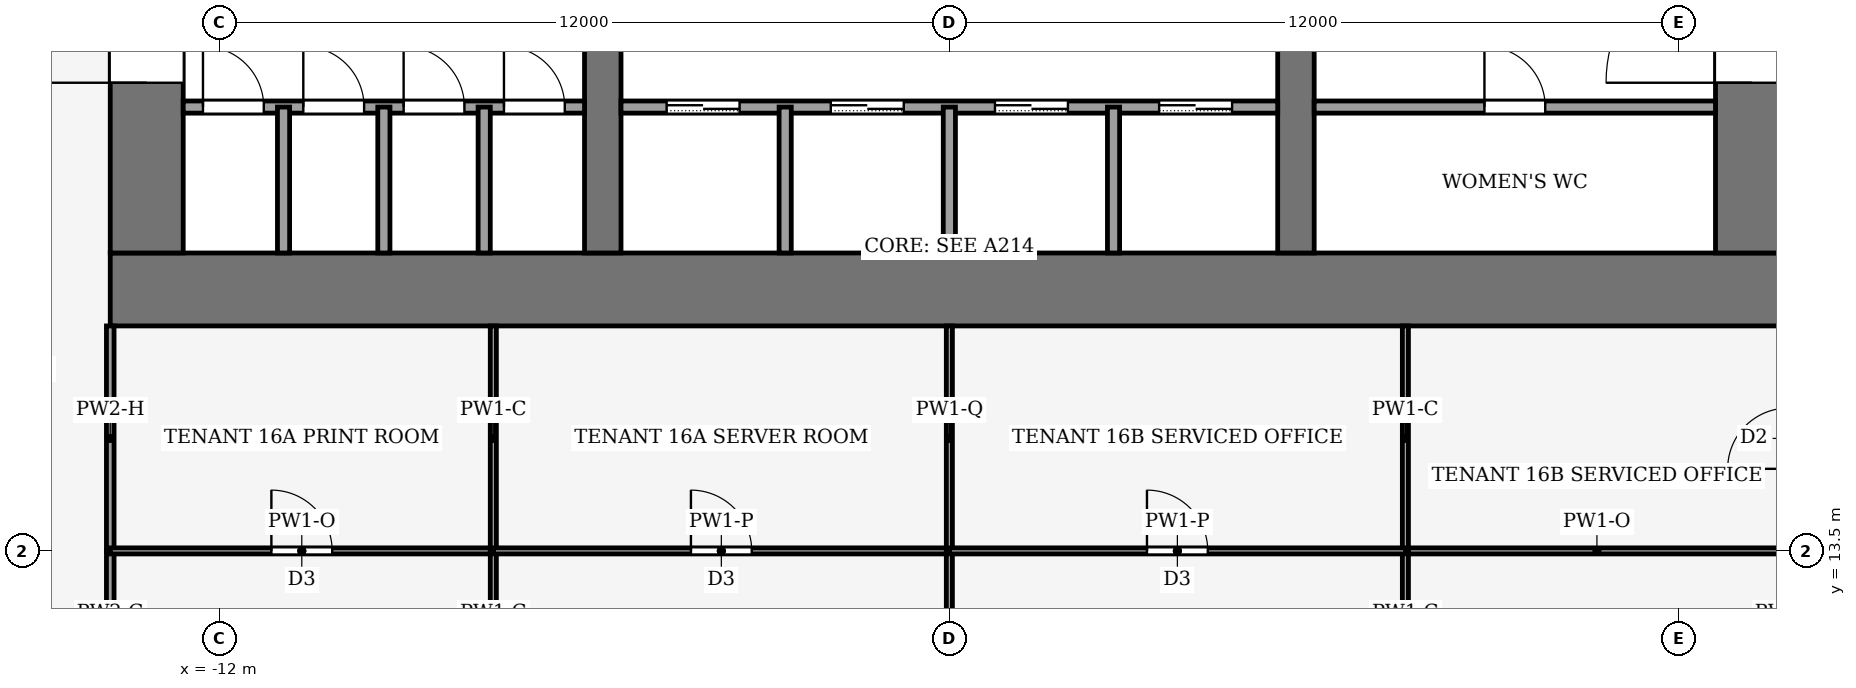
"""IFC4 building model, lengths in metres.
Left out: names, types, materials, properties, quantities, classifications, styles, units other than length and angle.
Written with IfcOpenShell. Run it as: python <this file> out.ifc"""

import sys

from ifc_helpers import new_model, si_unit, direction, frame, frame_2d, origin, place, context, subcontext, project, spatial, rectangle, extrude, element, fill, save


model = new_model("IFC4")
c1 = context("Model", 3, precision=1e-05, world=origin(), true_north=direction((0.0, 1.0)))
c2 = subcontext(c1, "Body", "Model", "MODEL_VIEW")
j1 = project(units=[si_unit("LENGTHUNIT", "METRE"), si_unit("PLANEANGLEUNIT", "RADIAN")], contexts=[c1])
p1 = place(None, origin())
s1 = spatial("IfcSite", under=j1, at=p1, CompositionType="ELEMENT")
p2 = place(p1, origin())
s2 = spatial("IfcBuilding", under=s1, at=p2, CompositionType="ELEMENT")
p3 = place(p2, frame((0.0, 0.0, 74.0)))
s3 = spatial("IfcBuildingStorey", under=s2, at=p3, CompositionType="ELEMENT", Elevation=74.0)
p4 = place(p3, frame((-13.8, 17.8, -0.13), z_axis=(0.0, 0.0, 1.0), x_axis=(1.0, 0.0, 0.0)))
e1 = element("IfcWall", 1, at=p4, inside=s3, PredefinedType="SHEAR", context=c2, shape_type="SweptSolid", body=[
    extrude(rectangle(XDim=27.6, YDim=1.2, at=frame_2d((13.8, 0.0))), origin(), (0.0, 0.0, 1.0), 4.0),
])
p5 = place(p3, frame((-13.2, 18.4, -0.13), z_axis=(0.0, 0.0, 1.0), x_axis=(0.0, 1.0, 0.0)))
e2 = element("IfcWall", 2, at=p5, inside=s3, PredefinedType="SHEAR", context=c2, shape_type="SweptSolid", body=[
    extrude(rectangle(XDim=19.2, YDim=1.2, at=frame_2d((9.6, 0.0))), origin(), (0.0, 0.0, 1.0), 4.0),
])
p6 = place(p5, frame((2.8, 0.0, 0.13)))
e3 = element("IfcOpeningElement", 3, at=p6, cuts=e2, PredefinedType="OPENING", context=c2, shape_type="SweptSolid", body=[
    extrude(rectangle(XDim=2.4, YDim=2.4, at=frame_2d((1.2, 1.2))), frame((0.0, 0.61, 0.0), z_axis=(0.0, -1.0, 0.0), x_axis=(1.0, 0.0, 0.0)), (0.0, 0.0, 1.0), 1.22),
])
p7 = place(p5, frame((13.4, 0.0, 0.13)))
e4 = element("IfcOpeningElement", 4, at=p7, cuts=e2, PredefinedType="OPENING", context=c2, shape_type="SweptSolid", body=[
    extrude(rectangle(XDim=1.4, YDim=2.2, at=frame_2d((0.7, 1.1))), frame((0.0, 0.61, 0.0), z_axis=(0.0, -1.0, 0.0), x_axis=(1.0, 0.0, 0.0)), (0.0, 0.0, 1.0), 1.22),
])
p8 = place(p3, frame((13.2, 18.4, -0.13), z_axis=(0.0, 0.0, 1.0), x_axis=(0.0, 1.0, 0.0)))
e5 = element("IfcWall", 5, at=p8, inside=s3, PredefinedType="SHEAR", context=c2, shape_type="SweptSolid", body=[
    extrude(rectangle(XDim=19.2, YDim=1.2, at=frame_2d((9.6, 0.0))), origin(), (0.0, 0.0, 1.0), 4.0),
])
p9 = place(p8, frame((2.8, 0.0, 0.13)))
e6 = element("IfcOpeningElement", 6, at=p9, cuts=e5, PredefinedType="OPENING", context=c2, shape_type="SweptSolid", body=[
    extrude(rectangle(XDim=2.4, YDim=2.4, at=frame_2d((1.2, 1.2))), frame((0.0, 0.61, 0.0), z_axis=(0.0, -1.0, 0.0), x_axis=(1.0, 0.0, 0.0)), (0.0, 0.0, 1.0), 1.22),
])
p10 = place(p8, frame((13.3, 0.0, 0.13)))
e7 = element("IfcOpeningElement", 7, at=p10, cuts=e5, PredefinedType="OPENING", context=c2, shape_type="SweptSolid", body=[
    extrude(rectangle(XDim=2.4, YDim=2.4, at=frame_2d((1.2, 1.2))), frame((0.0, 0.61, 0.0), z_axis=(0.0, -1.0, 0.0), x_axis=(1.0, 0.0, 0.0)), (0.0, 0.0, 1.0), 1.22),
])
p11 = place(p3, frame((-5.7, 18.4, -0.13), z_axis=(0.0, 0.0, 1.0), x_axis=(0.0, 1.0, 0.0)))
e8 = element("IfcWall", 8, at=p11, inside=s3, PredefinedType="SHEAR", context=c2, shape_type="SweptSolid", body=[
    extrude(rectangle(XDim=19.2, YDim=0.6, at=frame_2d((9.6, 0.0))), origin(), (0.0, 0.0, 1.0), 4.0),
])
p12 = place(p11, frame((8.35, 0.0, 0.13)))
e9 = element("IfcOpeningElement", 9, at=p12, cuts=e8, PredefinedType="OPENING", context=c2, shape_type="SweptSolid", body=[
    extrude(rectangle(XDim=0.9, YDim=2.1, at=frame_2d((0.45, 1.05))), frame((0.0, 0.31, 0.0), z_axis=(0.0, -1.0, 0.0), x_axis=(1.0, 0.0, 0.0)), (0.0, 0.0, 1.0), 0.62),
])
p13 = place(p3, frame((5.7, 18.4, -0.13), z_axis=(0.0, 0.0, 1.0), x_axis=(0.0, 1.0, 0.0)))
e10 = element("IfcWall", 10, at=p13, inside=s3, PredefinedType="SHEAR", context=c2, shape_type="SweptSolid", body=[
    extrude(rectangle(XDim=19.2, YDim=0.6, at=frame_2d((9.6, 0.0))), origin(), (0.0, 0.0, 1.0), 4.0),
])
p14 = place(p13, frame((8.35, 0.0, 0.13)))
e11 = element("IfcOpeningElement", 11, at=p14, cuts=e10, PredefinedType="OPENING", context=c2, shape_type="SweptSolid", body=[
    extrude(rectangle(XDim=0.9, YDim=2.1, at=frame_2d((0.45, 1.05))), frame((0.0, 0.31, 0.0), z_axis=(0.0, -1.0, 0.0), x_axis=(1.0, 0.0, 0.0)), (0.0, 0.0, 1.0), 0.62),
])
p15 = place(p13, frame((13.3, 0.0, 0.13)))
e12 = element("IfcOpeningElement", 12, at=p15, cuts=e10, PredefinedType="OPENING", context=c2, shape_type="SweptSolid", body=[
    extrude(rectangle(XDim=2.4, YDim=2.4, at=frame_2d((1.2, 1.2))), frame((0.0, 0.31, 0.0), z_axis=(0.0, -1.0, 0.0), x_axis=(1.0, 0.0, 0.0)), (0.0, 0.0, 1.0), 0.62),
])
p16 = place(p3, frame((-12.6, 20.8, 0.0), z_axis=(0.0, 0.0, 1.0), x_axis=(1.0, 0.0, 0.0)))
e13 = element("IfcWall", 13, at=p16, inside=s3, PredefinedType="PARTITIONING", context=c2, shape_type="SweptSolid", body=[
    extrude(rectangle(XDim=6.6, YDim=0.2, at=frame_2d((3.3, 0.0))), origin(), (0.0, 0.0, 1.0), 3.87),
])
p17 = place(p16, frame((0.325, 0.0, 0.0)))
e14 = element("IfcOpeningElement", 14, at=p17, cuts=e13, PredefinedType="OPENING", context=c2, shape_type="SweptSolid", body=[
    extrude(rectangle(XDim=1.0, YDim=2.1, at=frame_2d((0.5, 1.05))), frame((0.0, 0.11, 0.0), z_axis=(0.0, -1.0, 0.0), x_axis=(1.0, 0.0, 0.0)), (0.0, 0.0, 1.0), 0.22),
])
p18 = place(p16, frame((1.975, 0.0, 0.0)))
e15 = element("IfcOpeningElement", 15, at=p18, cuts=e13, PredefinedType="OPENING", context=c2, shape_type="SweptSolid", body=[
    extrude(rectangle(XDim=1.0, YDim=2.1, at=frame_2d((0.5, 1.05))), frame((0.0, 0.11, 0.0), z_axis=(0.0, -1.0, 0.0), x_axis=(1.0, 0.0, 0.0)), (0.0, 0.0, 1.0), 0.22),
])
p19 = place(p16, frame((3.625, 0.0, 0.0)))
e16 = element("IfcOpeningElement", 16, at=p19, cuts=e13, PredefinedType="OPENING", context=c2, shape_type="SweptSolid", body=[
    extrude(rectangle(XDim=1.0, YDim=2.1, at=frame_2d((0.5, 1.05))), frame((0.0, 0.11, 0.0), z_axis=(0.0, -1.0, 0.0), x_axis=(1.0, 0.0, 0.0)), (0.0, 0.0, 1.0), 0.22),
])
p20 = place(p16, frame((5.275, 0.0, 0.0)))
e17 = element("IfcOpeningElement", 17, at=p20, cuts=e13, PredefinedType="OPENING", context=c2, shape_type="SweptSolid", body=[
    extrude(rectangle(XDim=1.0, YDim=2.1, at=frame_2d((0.5, 1.05))), frame((0.0, 0.11, 0.0), z_axis=(0.0, -1.0, 0.0), x_axis=(1.0, 0.0, 0.0)), (0.0, 0.0, 1.0), 0.22),
])
p21 = place(p3, frame((-5.4, 20.8, 0.0), z_axis=(0.0, 0.0, 1.0), x_axis=(1.0, 0.0, 0.0)))
e18 = element("IfcWall", 18, at=p21, inside=s3, PredefinedType="PARTITIONING", context=c2, shape_type="SweptSolid", body=[
    extrude(rectangle(XDim=10.8, YDim=0.2, at=frame_2d((5.4, 0.0))), origin(), (0.0, 0.0, 1.0), 3.87),
])
p22 = place(p21, frame((0.75, 0.0, 0.0)))
e19 = element("IfcOpeningElement", 19, at=p22, cuts=e18, PredefinedType="OPENING", context=c2, shape_type="SweptSolid", body=[
    extrude(rectangle(XDim=1.2, YDim=2.2, at=frame_2d((0.6, 1.1))), frame((0.0, 0.11, 0.0), z_axis=(0.0, -1.0, 0.0), x_axis=(1.0, 0.0, 0.0)), (0.0, 0.0, 1.0), 0.22),
])
p23 = place(p21, frame((3.45, 0.0, 0.0)))
e20 = element("IfcOpeningElement", 20, at=p23, cuts=e18, PredefinedType="OPENING", context=c2, shape_type="SweptSolid", body=[
    extrude(rectangle(XDim=1.2, YDim=2.2, at=frame_2d((0.6, 1.1))), frame((0.0, 0.11, 0.0), z_axis=(0.0, -1.0, 0.0), x_axis=(1.0, 0.0, 0.0)), (0.0, 0.0, 1.0), 0.22),
])
p24 = place(p21, frame((6.15, 0.0, 0.0)))
e21 = element("IfcOpeningElement", 21, at=p24, cuts=e18, PredefinedType="OPENING", context=c2, shape_type="SweptSolid", body=[
    extrude(rectangle(XDim=1.2, YDim=2.2, at=frame_2d((0.6, 1.1))), frame((0.0, 0.11, 0.0), z_axis=(0.0, -1.0, 0.0), x_axis=(1.0, 0.0, 0.0)), (0.0, 0.0, 1.0), 0.22),
])
p25 = place(p21, frame((8.85, 0.0, 0.0)))
e22 = element("IfcOpeningElement", 22, at=p25, cuts=e18, PredefinedType="OPENING", context=c2, shape_type="SweptSolid", body=[
    extrude(rectangle(XDim=1.2, YDim=2.2, at=frame_2d((0.6, 1.1))), frame((0.0, 0.11, 0.0), z_axis=(0.0, -1.0, 0.0), x_axis=(1.0, 0.0, 0.0)), (0.0, 0.0, 1.0), 0.22),
])
p26 = place(p3, frame((6.0, 20.8, 0.0), z_axis=(0.0, 0.0, 1.0), x_axis=(1.0, 0.0, 0.0)))
e23 = element("IfcWall", 23, at=p26, inside=s3, PredefinedType="PARTITIONING", context=c2, shape_type="SweptSolid", body=[
    extrude(rectangle(XDim=6.6, YDim=0.2, at=frame_2d((3.3, 0.0))), origin(), (0.0, 0.0, 1.0), 3.87),
])
p27 = place(p26, frame((2.8, 0.0, 0.0)))
e24 = element("IfcOpeningElement", 24, at=p27, cuts=e23, PredefinedType="OPENING", context=c2, shape_type="SweptSolid", body=[
    extrude(rectangle(XDim=1.0, YDim=2.1, at=frame_2d((0.5, 1.05))), frame((0.0, 0.11, 0.0), z_axis=(0.0, -1.0, 0.0), x_axis=(1.0, 0.0, 0.0)), (0.0, 0.0, 1.0), 0.22),
])
for number, where, z_axis, x_axis in (
    (25, (-10.95, 18.4, 0.0), (0.0, 0.0, 1.0), (0.0, 1.0, 0.0)),
    (26, (-9.3, 18.4, 0.0), (0.0, 0.0, 1.0), (0.0, 1.0, 0.0)),
    (27, (-7.65, 18.4, 0.0), (0.0, 0.0, 1.0), (0.0, 1.0, 0.0)),
    (28, (-2.7, 18.4, 0.0), (0.0, 0.0, 1.0), (0.0, 1.0, 0.0)),
    (29, (0.0, 18.4, 0.0), (0.0, 0.0, 1.0), (0.0, 1.0, 0.0)),
    (30, (2.7, 18.4, 0.0), (0.0, 0.0, 1.0), (0.0, 1.0, 0.0)),
):
    element("IfcWall", number, at=place(p3, frame(where, z_axis=z_axis, x_axis=x_axis)), inside=s3, PredefinedType="PARTITIONING", context=c2, shape_type="SweptSolid", body=[
        extrude(rectangle(XDim=2.4, YDim=0.2, at=frame_2d((1.2, 0.0))), origin(), (0.0, 0.0, 1.0), 3.87),
    ])
p28 = place(p3, frame((-13.8, 10.5, 0.0), z_axis=(0.0, 0.0, 1.0), x_axis=(0.0, 1.0, 0.0)))
e31 = element("IfcWall", 31, at=p28, inside=s3, PredefinedType="PARTITIONING", context=c2, shape_type="SweptSolid", body=[
    extrude(rectangle(XDim=3.0, YDim=0.125, at=frame_2d((1.5, 0.0))), origin(), (0.0, 0.0, 1.0), 3.87),
])
p29 = place(p3, frame((-13.8, 13.5, 0.0), z_axis=(0.0, 0.0, 1.0), x_axis=(0.0, 1.0, 0.0)))
e32 = element("IfcWall", 32, at=p29, inside=s3, PredefinedType="PARTITIONING", context=c2, shape_type="SweptSolid", body=[
    extrude(rectangle(XDim=3.7, YDim=0.125, at=frame_2d((1.85, 0.0))), origin(), (0.0, 0.0, 1.0), 3.14),
])
p30 = place(p3, frame((-13.8, 13.5, 0.0), z_axis=(0.0, 0.0, 1.0), x_axis=(1.0, 0.0, 0.0)))
e33 = element("IfcWall", 33, at=p30, inside=s3, PredefinedType="PARTITIONING", context=c2, shape_type="SweptSolid", body=[
    extrude(rectangle(XDim=6.3, YDim=0.1, at=frame_2d((3.15, 0.0))), origin(), (0.0, 0.0, 1.0), 3.39),
])
p31 = place(p30, frame((2.65, 0.0, 0.0)))
e34 = element("IfcOpeningElement", 34, at=p31, cuts=e33, PredefinedType="OPENING", context=c2, shape_type="SweptSolid", body=[
    extrude(rectangle(XDim=1.0, YDim=2.1, at=frame_2d((0.5, 1.05))), frame((0.0, 0.06, 0.0), z_axis=(0.0, -1.0, 0.0), x_axis=(1.0, 0.0, 0.0)), (0.0, 0.0, 1.0), 0.12),
])
p32 = place(p3, frame((-7.5, 10.496, 0.0), z_axis=(0.0, 0.0, 1.0), x_axis=(0.0, 1.0, 0.0)))
e35 = element("IfcWall", 35, at=p32, inside=s3, PredefinedType="PARTITIONING", context=c2, shape_type="SweptSolid", body=[
    extrude(rectangle(XDim=3.004, YDim=0.1, at=frame_2d((1.502, 0.0))), origin(), (0.0, 0.0, 1.0), 3.87),
])
p33 = place(p3, frame((-7.5, 13.5, 0.0), z_axis=(0.0, 0.0, 1.0), x_axis=(0.0, 1.0, 0.0)))
e36 = element("IfcWall", 36, at=p33, inside=s3, PredefinedType="PARTITIONING", context=c2, shape_type="SweptSolid", body=[
    extrude(rectangle(XDim=3.7, YDim=0.1, at=frame_2d((1.85, 0.0))), origin(), (0.0, 0.0, 1.0), 3.87),
])
p34 = place(p3, frame((-7.5, 13.5, 0.0), z_axis=(0.0, 0.0, 1.0), x_axis=(1.0, 0.0, 0.0)))
e37 = element("IfcWall", 37, at=p34, inside=s3, PredefinedType="PARTITIONING", context=c2, shape_type="SweptSolid", body=[
    extrude(rectangle(XDim=7.5, YDim=0.1, at=frame_2d((3.75, 0.0))), origin(), (0.0, 0.0, 1.0), 3.44),
])
p35 = place(p34, frame((3.25, 0.0, 0.0)))
e38 = element("IfcOpeningElement", 38, at=p35, cuts=e37, PredefinedType="OPENING", context=c2, shape_type="SweptSolid", body=[
    extrude(rectangle(XDim=1.0, YDim=2.1, at=frame_2d((0.5, 1.05))), frame((0.0, 0.06, 0.0), z_axis=(0.0, -1.0, 0.0), x_axis=(1.0, 0.0, 0.0)), (0.0, 0.0, 1.0), 0.12),
])
p36 = place(p3, frame((0.0, 5.92, 0.0), z_axis=(0.0, 0.0, 1.0), x_axis=(0.0, 1.0, 0.0)))
e39 = element("IfcWall", 39, at=p36, inside=s3, PredefinedType="PARTITIONING", context=c2, shape_type="SweptSolid", body=[
    extrude(rectangle(XDim=7.58, YDim=0.1, at=frame_2d((3.79, 0.0))), origin(), (0.0, 0.0, 1.0), 3.04),
])
p37 = place(p3, frame((0.0, 13.5, 0.0), z_axis=(0.0, 0.0, 1.0), x_axis=(0.0, 1.0, 0.0)))
e40 = element("IfcWall", 40, at=p37, inside=s3, PredefinedType="PARTITIONING", context=c2, shape_type="SweptSolid", body=[
    extrude(rectangle(XDim=3.7, YDim=0.1, at=frame_2d((1.85, 0.0))), origin(), (0.0, 0.0, 1.0), 3.48),
])
p38 = place(p3, frame((13.8, 13.5, 0.0), z_axis=(0.0, 0.0, 1.0), x_axis=(-1.0, 0.0, 0.0)))
e41 = element("IfcWall", 41, at=p38, inside=s3, PredefinedType="PARTITIONING", context=c2, shape_type="SweptSolid", body=[
    extrude(rectangle(XDim=6.3, YDim=0.1, at=frame_2d((3.15, 0.0))), origin(), (0.0, 0.0, 1.0), 3.39),
])
p39 = place(p3, frame((7.5, 13.5, 0.0), z_axis=(0.0, 0.0, 1.0), x_axis=(0.0, -1.0, 0.0)))
e42 = element("IfcWall", 42, at=p39, inside=s3, PredefinedType="PARTITIONING", context=c2, shape_type="SweptSolid", body=[
    extrude(rectangle(XDim=3.004, YDim=0.1, at=frame_2d((1.502, 0.0))), origin(), (0.0, 0.0, 1.0), 3.87),
])
p40 = place(p3, frame((7.5, 17.2, 0.0), z_axis=(0.0, 0.0, 1.0), x_axis=(0.0, -1.0, 0.0)))
e43 = element("IfcWall", 43, at=p40, inside=s3, PredefinedType="PARTITIONING", context=c2, shape_type="SweptSolid", body=[
    extrude(rectangle(XDim=3.7, YDim=0.1, at=frame_2d((1.85, 0.0))), origin(), (0.0, 0.0, 1.0), 3.87),
])
p41 = place(p3, frame((0.0, 13.5, 0.0), z_axis=(0.0, 0.0, 1.0), x_axis=(1.0, 0.0, 0.0)))
e44 = element("IfcWall", 44, at=p41, inside=s3, PredefinedType="PARTITIONING", context=c2, shape_type="SweptSolid", body=[
    extrude(rectangle(XDim=7.5, YDim=0.1, at=frame_2d((3.75, 0.0))), origin(), (0.0, 0.0, 1.0), 3.44),
])
p42 = place(p41, frame((3.25, 0.0, 0.0)))
e45 = element("IfcOpeningElement", 45, at=p42, cuts=e44, PredefinedType="OPENING", context=c2, shape_type="SweptSolid", body=[
    extrude(rectangle(XDim=1.0, YDim=2.1, at=frame_2d((0.5, 1.05))), frame((0.0, 0.06, 0.0), z_axis=(0.0, -1.0, 0.0), x_axis=(1.0, 0.0, 0.0)), (0.0, 0.0, 1.0), 0.12),
])
p43 = place(p22, origin())
e46 = element("IfcDoor", 46, at=p43, inside=s3, OperationType="SLIDING_TO_LEFT", PredefinedType="DOOR", context=c2, shape_type="SweptSolid", body=[
    extrude(rectangle(XDim=1.2, YDim=2.2, at=frame_2d((0.6, 1.1))), frame((0.0, 0.025, 0.0), z_axis=(0.0, -1.0, 0.0), x_axis=(1.0, 0.0, 0.0)), (0.0, 0.0, 1.0), 0.05),
])
fill(e19, e46)
p44 = place(p23, origin())
e47 = element("IfcDoor", 47, at=p44, inside=s3, OperationType="SLIDING_TO_LEFT", PredefinedType="DOOR", context=c2, shape_type="SweptSolid", body=[
    extrude(rectangle(XDim=1.2, YDim=2.2, at=frame_2d((0.6, 1.1))), frame((0.0, 0.025, 0.0), z_axis=(0.0, -1.0, 0.0), x_axis=(1.0, 0.0, 0.0)), (0.0, 0.0, 1.0), 0.05),
])
fill(e20, e47)
p45 = place(p24, origin())
e48 = element("IfcDoor", 48, at=p45, inside=s3, OperationType="SLIDING_TO_LEFT", PredefinedType="DOOR", context=c2, shape_type="SweptSolid", body=[
    extrude(rectangle(XDim=1.2, YDim=2.2, at=frame_2d((0.6, 1.1))), frame((0.0, 0.025, 0.0), z_axis=(0.0, -1.0, 0.0), x_axis=(1.0, 0.0, 0.0)), (0.0, 0.0, 1.0), 0.05),
])
fill(e21, e48)
p46 = place(p25, origin())
e49 = element("IfcDoor", 49, at=p46, inside=s3, OperationType="SLIDING_TO_LEFT", PredefinedType="DOOR", context=c2, shape_type="SweptSolid", body=[
    extrude(rectangle(XDim=1.2, YDim=2.2, at=frame_2d((0.6, 1.1))), frame((0.0, 0.025, 0.0), z_axis=(0.0, -1.0, 0.0), x_axis=(1.0, 0.0, 0.0)), (0.0, 0.0, 1.0), 0.05),
])
fill(e22, e49)
p47 = place(p17, origin())
e50 = element("IfcDoor", 50, at=p47, inside=s3, OperationType="SINGLE_SWING_RIGHT", PredefinedType="DOOR", context=c2, shape_type="SweptSolid", body=[
    extrude(rectangle(XDim=1.0, YDim=2.1, at=frame_2d((0.5, 1.05))), frame((0.0, 0.025, 0.0), z_axis=(0.0, -1.0, 0.0), x_axis=(1.0, 0.0, 0.0)), (0.0, 0.0, 1.0), 0.05),
])
fill(e14, e50)
p48 = place(p18, origin())
e51 = element("IfcDoor", 51, at=p48, inside=s3, OperationType="SINGLE_SWING_RIGHT", PredefinedType="DOOR", context=c2, shape_type="SweptSolid", body=[
    extrude(rectangle(XDim=1.0, YDim=2.1, at=frame_2d((0.5, 1.05))), frame((0.0, 0.025, 0.0), z_axis=(0.0, -1.0, 0.0), x_axis=(1.0, 0.0, 0.0)), (0.0, 0.0, 1.0), 0.05),
])
fill(e15, e51)
p49 = place(p19, origin())
e52 = element("IfcDoor", 52, at=p49, inside=s3, OperationType="SINGLE_SWING_LEFT", PredefinedType="DOOR", context=c2, shape_type="SweptSolid", body=[
    extrude(rectangle(XDim=1.0, YDim=2.1, at=frame_2d((0.5, 1.05))), frame((0.0, 0.025, 0.0), z_axis=(0.0, -1.0, 0.0), x_axis=(1.0, 0.0, 0.0)), (0.0, 0.0, 1.0), 0.05),
])
fill(e16, e52)
p50 = place(p20, origin())
e53 = element("IfcDoor", 53, at=p50, inside=s3, OperationType="SINGLE_SWING_LEFT", PredefinedType="DOOR", context=c2, shape_type="SweptSolid", body=[
    extrude(rectangle(XDim=1.0, YDim=2.1, at=frame_2d((0.5, 1.05))), frame((0.0, 0.025, 0.0), z_axis=(0.0, -1.0, 0.0), x_axis=(1.0, 0.0, 0.0)), (0.0, 0.0, 1.0), 0.05),
])
fill(e17, e53)
p51 = place(p27, origin())
e54 = element("IfcDoor", 54, at=p51, inside=s3, OperationType="SINGLE_SWING_LEFT", PredefinedType="DOOR", context=c2, shape_type="SweptSolid", body=[
    extrude(rectangle(XDim=1.0, YDim=2.1, at=frame_2d((0.5, 1.05))), frame((0.0, 0.025, 0.0), z_axis=(0.0, -1.0, 0.0), x_axis=(1.0, 0.0, 0.0)), (0.0, 0.0, 1.0), 0.05),
])
fill(e24, e54)
p52 = place(p6, origin())
e55 = element("IfcDoor", 55, at=p52, inside=s3, OperationType="DOUBLE_DOOR_SINGLE_SWING", PredefinedType="DOOR", context=c2, shape_type="SweptSolid", body=[
    extrude(rectangle(XDim=2.4, YDim=2.4, at=frame_2d((1.2, 1.2))), frame((0.0, 0.025, 0.0), z_axis=(0.0, -1.0, 0.0), x_axis=(1.0, 0.0, 0.0)), (0.0, 0.0, 1.0), 0.05),
])
fill(e3, e55)
p53 = place(p9, origin())
e56 = element("IfcDoor", 56, at=p53, inside=s3, OperationType="DOUBLE_DOOR_SINGLE_SWING", PredefinedType="DOOR", context=c2, shape_type="SweptSolid", body=[
    extrude(rectangle(XDim=2.4, YDim=2.4, at=frame_2d((1.2, 1.2))), frame((0.0, 0.025, 0.0), z_axis=(0.0, -1.0, 0.0), x_axis=(1.0, 0.0, 0.0)), (0.0, 0.0, 1.0), 0.05),
])
fill(e6, e56)
p54 = place(p31, origin())
e57 = element("IfcDoor", 57, at=p54, inside=s3, OperationType="SINGLE_SWING_LEFT", PredefinedType="DOOR", context=c2, shape_type="SweptSolid", body=[
    extrude(rectangle(XDim=1.0, YDim=2.1, at=frame_2d((0.5, 1.05))), frame((0.0, 0.025, 0.0), z_axis=(0.0, -1.0, 0.0), x_axis=(1.0, 0.0, 0.0)), (0.0, 0.0, 1.0), 0.05),
])
fill(e34, e57)
p55 = place(p35, origin())
e58 = element("IfcDoor", 58, at=p55, inside=s3, OperationType="SINGLE_SWING_RIGHT", PredefinedType="DOOR", context=c2, shape_type="SweptSolid", body=[
    extrude(rectangle(XDim=1.0, YDim=2.1, at=frame_2d((0.5, 1.05))), frame((0.0, 0.025, 0.0), z_axis=(0.0, -1.0, 0.0), x_axis=(1.0, 0.0, 0.0)), (0.0, 0.0, 1.0), 0.05),
])
fill(e38, e58)
p56 = place(p42, origin())
e59 = element("IfcDoor", 59, at=p56, inside=s3, OperationType="SINGLE_SWING_LEFT", PredefinedType="DOOR", context=c2, shape_type="SweptSolid", body=[
    extrude(rectangle(XDim=1.0, YDim=2.1, at=frame_2d((0.5, 1.05))), frame((0.0, 0.025, 0.0), z_axis=(0.0, -1.0, 0.0), x_axis=(1.0, 0.0, 0.0)), (0.0, 0.0, 1.0), 0.05),
])
fill(e45, e59)
save(model, sys.argv[1])
